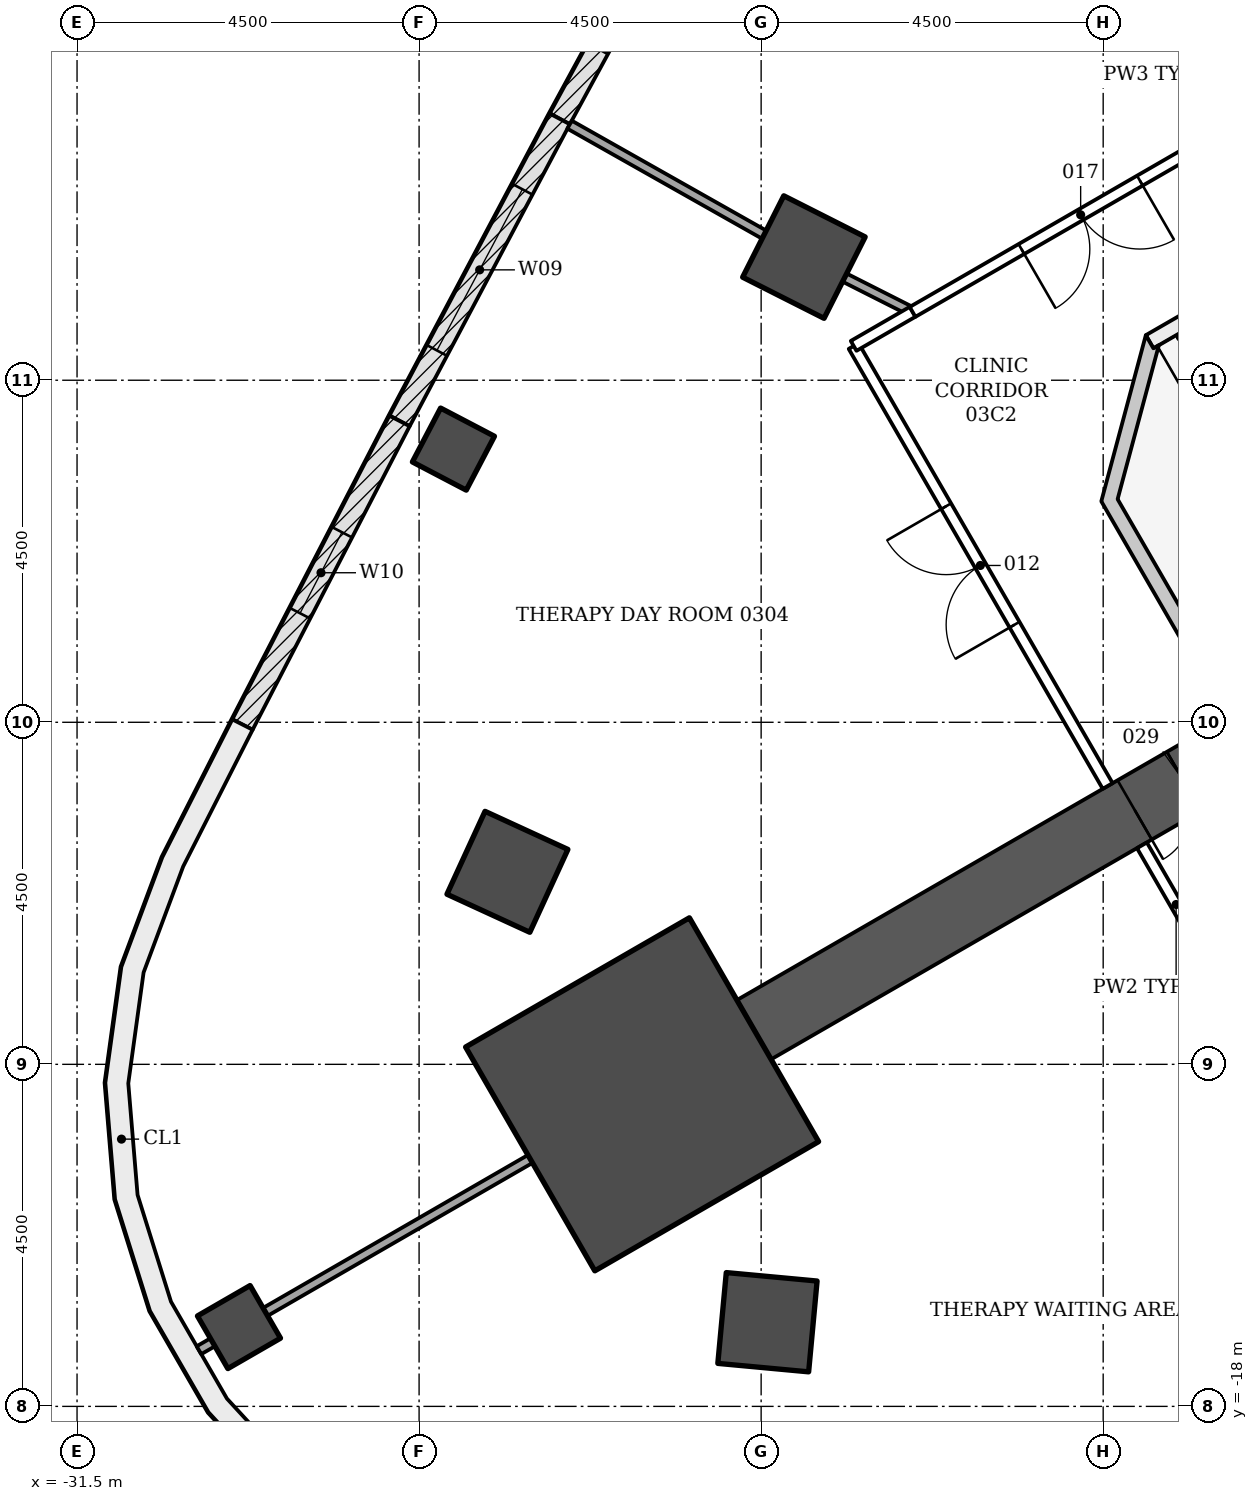
"""IFC4 building model, lengths in metres.
Left out: names, types, materials, properties, quantities, classifications, styles, units other than length and angle.
Written with IfcOpenShell. Run it as: python <this file> out.ifc"""

import sys

from ifc_helpers import new_model, si_unit, direction, frame, frame_2d, origin, origin_2d, place, context, subcontext, project, spatial, polyline, rectangle, outline, extrude, element, fill, save


model = new_model("IFC4")
c1 = context("Model", 3, precision=1e-05, world=origin(), true_north=direction((0.0, 1.0)))
c2 = subcontext(c1, "Body", "Model", "MODEL_VIEW")
j1 = project(units=[si_unit("LENGTHUNIT", "METRE"), si_unit("PLANEANGLEUNIT", "RADIAN")], contexts=[c1])
p1 = place(None, origin())
s1 = spatial("IfcSite", under=j1, at=p1, CompositionType="ELEMENT")
p2 = place(p1, origin())
s2 = spatial("IfcBuilding", under=s1, at=p2, CompositionType="ELEMENT")
p3 = place(p2, frame((0.0, 0.0, 15.0)))
s3 = spatial("IfcBuildingStorey", under=s2, at=p3, CompositionType="ELEMENT", Elevation=15.0)
for number, where, z_axis, x_axis in (
    (1, (-21.937, -2.88, -0.25), (0.0, 0.0, 1.0), (-0.893, 0.451, 0.0)),
    (2, (-25.838, -10.967, -0.25), (0.0, 0.0, 1.0), (-0.909, 0.418, 0.0)),
    (3, (-22.417, -16.893, -0.25), (0.0, 0.0, 1.0), (-0.093, -0.996, 0.0)),
):
    element("IfcColumn", number, at=place(p3, frame(where, z_axis=z_axis, x_axis=x_axis)), inside=s3, PredefinedType="COLUMN", context=c2, shape_type="SweptSolid", body=[
        extrude(rectangle(XDim=1.2, YDim=1.2, at=origin_2d()), origin(), (0.0, 0.0, 1.0), 4.5),
    ])
for number, where, z_axis, x_axis in (
    (4, (-26.548, -5.406, -0.25), (0.0, 0.0, 1.0), (-0.886, 0.464, 0.0)),
    (5, (-29.37, -16.957, -0.25), (0.0, 0.0, 1.0), (-0.866, -0.5, 0.0)),
):
    element("IfcColumn", number, at=place(p3, frame(where, z_axis=z_axis, x_axis=x_axis)), inside=s3, PredefinedType="COLUMN", context=c2, shape_type="SweptSolid", body=[
        extrude(rectangle(XDim=0.8, YDim=0.8, at=origin_2d()), origin(), (0.0, 0.0, 1.0), 4.5),
    ])
p4 = place(p3, frame((-9.922, -5.728, -0.25), z_axis=(0.0, 0.0, 1.0), x_axis=(-0.866028046028, -0.499995423472, 0.0)))
e6 = element("IfcWall", 6, at=p4, inside=s3, PredefinedType="SHEAR", context=c2, shape_type="SweptSolid", body=[
    extrude(rectangle(XDim=14.633, YDim=0.9, at=frame_2d((7.316, 0.0))), origin(), (0.0, 0.0, 1.0), 4.5),
])
p5 = place(p4, frame((7.35, 0.0, 0.25)))
e7 = element("IfcOpeningElement", 7, at=p5, cuts=e6, PredefinedType="OPENING", context=c2, shape_type="SweptSolid", body=[
    extrude(rectangle(XDim=1.5, YDim=2.1, at=frame_2d((0.75, 1.05))), frame((0.0, 0.46, 0.0), z_axis=(0.0, -1.0, 0.0), x_axis=(1.0, 0.0, 0.0)), (0.0, 0.0, 1.0), 0.92),
])
p6 = place(p3, frame((-24.066, -13.895, -0.25), z_axis=(0.0, 0.0, 1.0), x_axis=(-0.866025403784, -0.5, 0.0)))
e8 = element("IfcColumn", 8, at=p6, inside=s3, PredefinedType="COLUMN", context=c2, shape_type="SweptSolid", body=[
    extrude(rectangle(XDim=3.4, YDim=3.4, at=origin_2d()), origin(), (0.0, 0.0, 1.0), 4.5),
])
p7 = place(p3, frame((-25.148, -1.06, 0.0), z_axis=(0.0, 0.0, 1.0), x_axis=(0.477577109439, 0.878589838628, 0.0)))
e9 = element("IfcWall", 9, at=p7, inside=s3, PredefinedType="NOTDEFINED", context=c2, shape_type="SweptSolid", body=[
    extrude(rectangle(XDim=4.496, YDim=0.3, at=frame_2d((2.248, 0.0))), origin(), (0.0, 0.0, 1.0), 4.25),
])
p8 = place(p7, frame((1.048, 0.0, 0.9)))
e10 = element("IfcOpeningElement", 10, at=p8, cuts=e9, PredefinedType="OPENING", context=c2, shape_type="SweptSolid", body=[
    extrude(rectangle(XDim=2.4, YDim=2.4, at=frame_2d((1.2, 1.2))), frame((0.0, 0.16, 0.0), z_axis=(0.0, -1.0, 0.0), x_axis=(1.0, 0.0, 0.0)), (0.0, 0.0, 1.0), 0.32),
])
p9 = place(p3, frame((-27.256, -5.034, 0.0), z_axis=(0.0, 0.0, 1.0), x_axis=(0.468566202388, 0.883428386447, 0.0)))
e11 = element("IfcWall", 11, at=p9, inside=s3, PredefinedType="NOTDEFINED", context=c2, shape_type="SweptSolid", body=[
    extrude(rectangle(XDim=4.496, YDim=0.3, at=frame_2d((2.248, 0.0))), origin(), (0.0, 0.0, 1.0), 4.25),
])
p10 = place(p9, frame((1.048, 0.0, 0.9)))
e12 = element("IfcOpeningElement", 12, at=p10, cuts=e11, PredefinedType="OPENING", context=c2, shape_type="SweptSolid", body=[
    extrude(rectangle(XDim=2.4, YDim=2.4, at=frame_2d((1.2, 1.2))), frame((0.0, 0.16, 0.0), z_axis=(0.0, -1.0, 0.0), x_axis=(1.0, 0.0, 0.0)), (0.0, 0.0, 1.0), 0.32),
])
p11 = place(p3, frame((-29.323, -9.029, 0.0), z_axis=(0.0, 0.0, 1.0), x_axis=(0.459443600121, 0.888206945654, 0.0)))
e13 = element("IfcWall", 13, at=p11, inside=s3, PredefinedType="NOTDEFINED", context=c2, shape_type="SweptSolid", body=[
    extrude(rectangle(XDim=4.496, YDim=0.3, at=frame_2d((2.248, 0.0))), origin(), (0.0, 0.0, 1.0), 4.25),
])
p12 = place(p11, frame((1.648, 0.0, 0.8)))
e14 = element("IfcOpeningElement", 14, at=p12, cuts=e13, PredefinedType="OPENING", context=c2, shape_type="SweptSolid", body=[
    extrude(rectangle(XDim=1.2, YDim=3.0, at=frame_2d((0.6, 1.5))), frame((0.0, 0.16, 0.0), z_axis=(0.0, -1.0, 0.0), x_axis=(1.0, 0.0, 0.0)), (0.0, 0.0, 1.0), 0.32),
])
p13 = place(p3, origin())
e15 = element("IfcWall", 15, at=p13, inside=s3, PredefinedType="NOTDEFINED", context=c2, shape_type="SweptSolid", body=[
    extrude(outline(polyline([(-29.457, -8.962), (-30.379, -10.776), (-30.917, -12.218), (-31.128, -13.742), (-31.0, -15.276), (-30.54, -16.744), (-29.771, -18.077), (-28.729, -19.209), (-27.465, -20.086), (-26.04, -20.666), (-24.522, -20.921), (-22.49, -21.03), (-22.474, -20.73), (-24.489, -20.622), (-25.957, -20.376), (-27.321, -19.821), (-28.531, -18.981), (-29.528, -17.898), (-30.264, -16.623), (-30.704, -15.218), (-30.826, -13.75), (-30.625, -12.292), (-30.104, -10.897), (-29.19, -9.098), (-29.457, -8.962)])), origin(), (0.0, 0.0, 1.0), 4.25),
])
p14 = place(p3, frame((-12.539, -1.194, -0.25), z_axis=(0.0, 0.0, 1.0), x_axis=(-0.866045472092, -0.499965239061, 0.0)))
e16 = element("IfcWall", 16, at=p14, inside=s3, PredefinedType="SHEAR", context=c2, shape_type="SweptSolid", body=[
    extrude(rectangle(XDim=5.6, YDim=0.2, at=frame_2d((2.8, 0.0))), origin(), (0.0, 0.0, 1.0), 4.5),
])
p15 = place(p14, frame((0.45, 0.0, 0.25)))
e17 = element("IfcOpeningElement", 17, at=p15, cuts=e16, PredefinedType="OPENING", context=c2, shape_type="SweptSolid", body=[
    extrude(rectangle(XDim=1.2, YDim=2.1, at=frame_2d((0.6, 1.05))), frame((0.0, 0.11, 0.0), z_axis=(0.0, -1.0, 0.0), x_axis=(1.0, 0.0, 0.0)), (0.0, 0.0, 1.0), 0.22),
])
p16 = place(p3, frame((0.0, 0.0, -0.25)))
e18 = element("IfcWall", 18, at=p16, inside=s3, PredefinedType="SHEAR", context=c2, shape_type="SweptSolid", body=[
    extrude(outline(polyline([(-17.439, -3.907), (-18.025, -6.093), (-16.95, -7.955), (-16.777, -7.855), (-17.81, -6.065), (-17.267, -4.039), (-17.339, -4.081), (-17.339, -4.081), (-17.339, -4.081), (-17.339, -4.081), (-17.339, -4.081), (-17.339, -4.081), (-17.339, -4.081), (-17.339, -4.081), (-17.339, -4.081), (-17.339, -4.081), (-17.339, -4.081), (-17.339, -4.081), (-17.339, -4.081), (-17.339, -4.081), (-17.339, -4.081), (-17.339, -4.081), (-17.339, -4.081), (-17.439, -3.907)])), origin(), (0.0, 0.0, 1.0), 4.5),
])
p17 = place(p3, frame((-16.591, -12.176, 0.0), z_axis=(0.0, 0.0, 1.0), x_axis=(-0.499965372359, 0.866045395139, 0.0)))
e19 = element("IfcWall", 19, at=p17, inside=s3, PredefinedType="PARTITIONING", context=c2, shape_type="SweptSolid", body=[
    extrude(rectangle(XDim=1.798, YDim=0.15, at=frame_2d((0.899, 0.0))), origin(), (0.0, 0.0, 1.0), 3.638),
])
p18 = place(p3, frame((-29.716, -17.157, 0.0), z_axis=(0.0, 0.0, 1.0), x_axis=(-0.865774595023, -0.500434162116, 0.0)))
e20 = element("IfcWall", 20, at=p18, inside=s3, PredefinedType="PARTITIONING", context=c2, shape_type="SweptSolid", body=[
    extrude(rectangle(XDim=0.208, YDim=0.12, at=frame_2d((0.104, 0.0))), origin(), (0.0, 0.0, 1.0), 4.25),
])
p19 = place(p3, frame((-25.538, -14.745, 0.0), z_axis=(0.0, 0.0, 1.0), x_axis=(-0.866027971625, -0.499995552344, 0.0)))
e21 = element("IfcWall", 21, at=p19, inside=s3, PredefinedType="PARTITIONING", context=c2, shape_type="SweptSolid", body=[
    extrude(rectangle(XDim=4.024, YDim=0.12, at=frame_2d((2.012, 0.0))), origin(), (0.0, 0.0, 1.0), 3.717),
])
p20 = place(p3, frame((-17.941, -9.838, 0.0), z_axis=(0.0, 0.0, 1.0), x_axis=(-0.500048140185, 0.865997608252, 0.0)))
e22 = element("IfcWall", 22, at=p20, inside=s3, PredefinedType="PARTITIONING", context=c2, shape_type="SweptSolid", body=[
    extrude(rectangle(XDim=6.683, YDim=0.15, at=frame_2d((3.342, 0.0))), origin(), (0.0, 0.0, 1.0), 3.638),
])
p21 = place(p20, frame((2.45, 0.0, 0.0)))
e23 = element("IfcOpeningElement", 23, at=p21, cuts=e22, PredefinedType="OPENING", context=c2, shape_type="SweptSolid", body=[
    extrude(rectangle(XDim=1.8, YDim=2.1, at=frame_2d((0.9, 1.05))), frame((0.0, 0.085, 0.0), z_axis=(0.0, -1.0, 0.0), x_axis=(1.0, 0.0, 0.0)), (0.0, 0.0, 1.0), 0.17),
])
p22 = place(p3, frame((-21.283, -4.048, 0.0), z_axis=(0.0, 0.0, 1.0), x_axis=(0.865804825377, 0.500381858538, 0.0)))
e24 = element("IfcWall", 24, at=p22, inside=s3, PredefinedType="PARTITIONING", context=c2, shape_type="SweptSolid", body=[
    extrude(rectangle(XDim=0.897, YDim=0.15, at=frame_2d((0.449, 0.0))), origin(), (0.0, 0.0, 1.0), 3.638),
])
p23 = place(p3, frame((-22.461, -2.584, 0.0), z_axis=(0.0, 0.0, 1.0), x_axis=(-0.870620069476, 0.491955988505, 0.0)))
e25 = element("IfcWall", 25, at=p23, inside=s3, PredefinedType="PARTITIONING", context=c2, shape_type="SweptSolid", body=[
    extrude(rectangle(XDim=2.939, YDim=0.12, at=frame_2d((1.47, 0.0))), origin(), (0.0, 0.0, 1.0), 3.633),
])
p24 = place(p3, frame((-20.509, -3.601, 0.0), z_axis=(0.0, 0.0, 1.0), x_axis=(-0.892316605155, 0.451410097544, 0.0)))
e26 = element("IfcWall", 26, at=p24, inside=s3, PredefinedType="PARTITIONING", context=c2, shape_type="SweptSolid", body=[
    extrude(rectangle(XDim=1.0, YDim=0.12, at=frame_2d((0.5, 0.0))), origin(), (0.0, 0.0, 1.0), 3.638),
])
p25 = place(p3, frame((-16.088, -1.049, 0.0), z_axis=(0.0, 0.0, 1.0), x_axis=(-0.866023883975, -0.500002632377, 0.0)))
e27 = element("IfcWall", 27, at=p25, inside=s3, PredefinedType="PARTITIONING", context=c2, shape_type="SweptSolid", body=[
    extrude(rectangle(XDim=5.104, YDim=0.15, at=frame_2d((2.552, 0.0))), origin(), (0.0, 0.0, 1.0), 3.638),
])
p26 = place(p25, frame((1.65, 0.0, 0.0)))
e28 = element("IfcOpeningElement", 28, at=p26, cuts=e27, PredefinedType="OPENING", context=c2, shape_type="SweptSolid", body=[
    extrude(rectangle(XDim=1.8, YDim=2.1, at=frame_2d((0.9, 1.05))), frame((0.0, 0.085, 0.0), z_axis=(0.0, -1.0, 0.0), x_axis=(1.0, 0.0, 0.0)), (0.0, 0.0, 1.0), 0.17),
])
p27 = place(p10, origin())
e29 = element("IfcWindow", 29, at=p27, inside=s3, PartitioningType="DOUBLE_PANEL_VERTICAL", PredefinedType="WINDOW", context=c2, shape_type="SweptSolid", body=[
    extrude(rectangle(XDim=2.4, YDim=2.4, at=frame_2d((1.2, 1.2))), frame((0.0, 0.03, 0.0), z_axis=(0.0, -1.0, 0.0), x_axis=(1.0, 0.0, 0.0)), (0.0, 0.0, 1.0), 0.06),
])
fill(e12, e29)
p28 = place(p12, origin())
e30 = element("IfcWindow", 30, at=p28, inside=s3, PartitioningType="SINGLE_PANEL", PredefinedType="WINDOW", context=c2, shape_type="SweptSolid", body=[
    extrude(rectangle(XDim=1.2, YDim=3.0, at=frame_2d((0.6, 1.5))), frame((0.0, 0.03, 0.0), z_axis=(0.0, -1.0, 0.0), x_axis=(1.0, 0.0, 0.0)), (0.0, 0.0, 1.0), 0.06),
])
fill(e14, e30)
p29 = place(p21, origin())
e31 = element("IfcDoor", 31, at=p29, inside=s3, OperationType="DOUBLE_DOOR_SINGLE_SWING", PredefinedType="DOOR", context=c2, shape_type="SweptSolid", body=[
    extrude(rectangle(XDim=1.8, YDim=2.1, at=frame_2d((0.9, 1.05))), frame((0.0, 0.025, 0.0), z_axis=(0.0, -1.0, 0.0), x_axis=(1.0, 0.0, 0.0)), (0.0, 0.0, 1.0), 0.05),
])
fill(e23, e31)
p30 = place(p26, origin())
e32 = element("IfcDoor", 32, at=p30, inside=s3, OperationType="DOUBLE_DOOR_SINGLE_SWING", PredefinedType="DOOR", context=c2, shape_type="SweptSolid", body=[
    extrude(rectangle(XDim=1.8, YDim=2.1, at=frame_2d((0.9, 1.05))), frame((0.0, 0.025, 0.0), z_axis=(0.0, -1.0, 0.0), x_axis=(1.0, 0.0, 0.0)), (0.0, 0.0, 1.0), 0.05),
])
fill(e28, e32)
p31 = place(p5, origin())
e33 = element("IfcDoor", 33, at=p31, inside=s3, OperationType="DOUBLE_DOOR_SINGLE_SWING", PredefinedType="DOOR", context=c2, shape_type="SweptSolid", body=[
    extrude(rectangle(XDim=1.5, YDim=2.1, at=frame_2d((0.75, 1.05))), frame((0.0, 0.025, 0.0), z_axis=(0.0, -1.0, 0.0), x_axis=(1.0, 0.0, 0.0)), (0.0, 0.0, 1.0), 0.05),
])
fill(e7, e33)
save(model, sys.argv[1])
